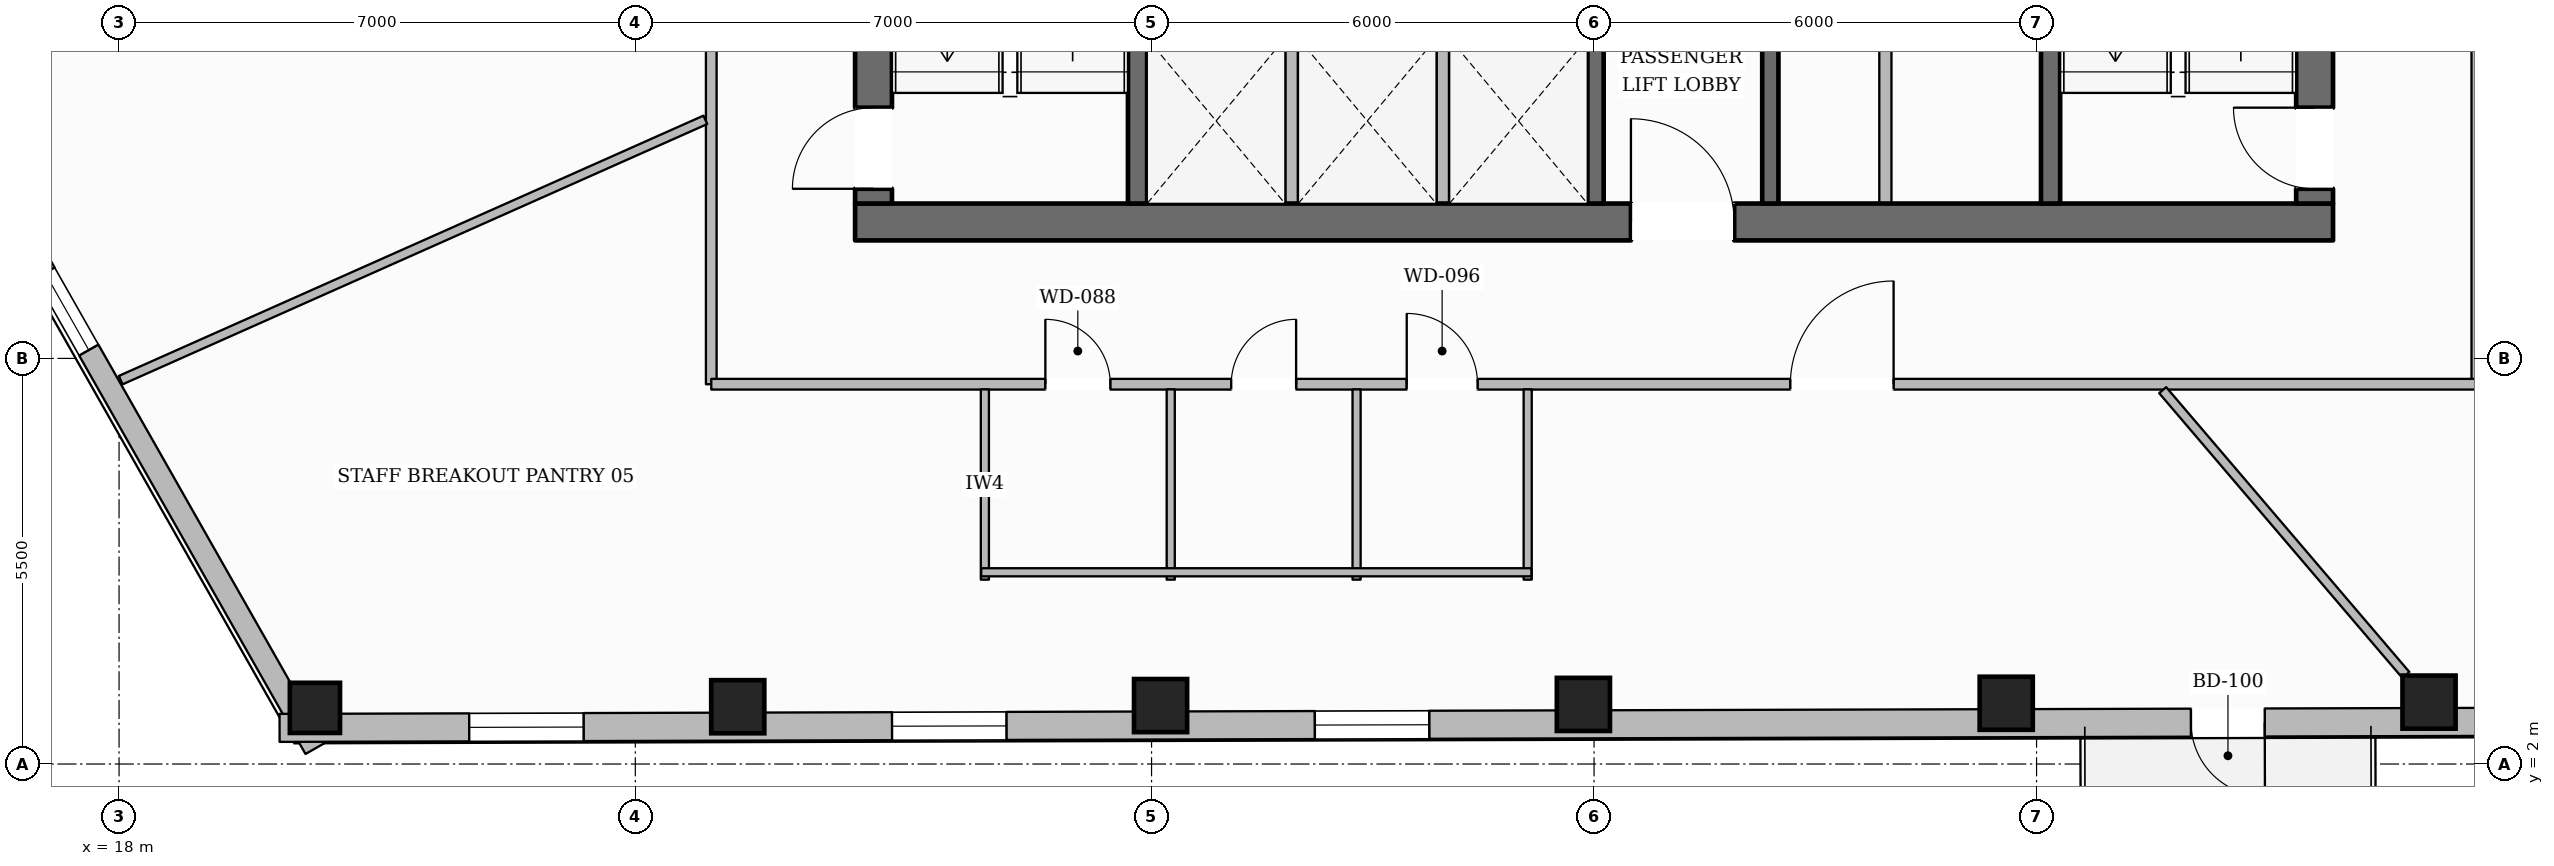
"""IFC4 building model, lengths in metres.
Left out: names, types, materials, properties, quantities, classifications, styles, units other than length and angle.
Written with IfcOpenShell. Run it as: python <this file> out.ifc"""

import sys

from ifc_helpers import new_model, si_unit, direction, frame, frame_2d, origin, origin_2d, place, context, subcontext, project, spatial, rectangle, hollow_rectangle, extrude, element, fill, save


model = new_model("IFC4")
c1 = context("Model", 3, precision=1e-05, world=origin(), true_north=direction((0.0, 1.0)))
c2 = subcontext(c1, "Body", "Model", "MODEL_VIEW")
j1 = project(units=[si_unit("LENGTHUNIT", "METRE"), si_unit("PLANEANGLEUNIT", "RADIAN")], contexts=[c1])
p1 = place(None, origin())
s1 = spatial("IfcSite", under=j1, at=p1, CompositionType="ELEMENT")
p2 = place(p1, origin())
s2 = spatial("IfcBuilding", under=s1, at=p2, CompositionType="ELEMENT")
p3 = place(p2, frame((0.0, 0.0, 89.35)))
s3 = spatial("IfcBuildingStorey", under=s2, at=p3, CompositionType="ELEMENT", Elevation=89.35)
p4 = place(p3, frame((27.98, 9.35, 0.0), z_axis=(0.0, 0.0, 1.0), x_axis=(1.0, 0.0, 0.0)))
e1 = element("IfcWall", 1, at=p4, inside=s3, PredefinedType="SOLIDWALL", context=c2, shape_type="SweptSolid", body=[
    extrude(rectangle(XDim=20.04, YDim=0.5, at=frame_2d((10.02, 0.0))), origin(), (0.0, 0.0, 1.0), 3.6),
])
p5 = place(p4, frame((10.52, 0.0, 0.0)))
e2 = element("IfcOpeningElement", 2, at=p5, cuts=e1, PredefinedType="OPENING", context=c2, shape_type="SweptSolid", body=[
    extrude(rectangle(XDim=1.4, YDim=2.2, at=frame_2d((0.7, 1.1))), frame((0.0, 0.26, 0.0), z_axis=(0.0, -1.0, 0.0), x_axis=(1.0, 0.0, 0.0)), (0.0, 0.0, 1.0), 0.52),
])
p6 = place(p3, frame((28.23, 9.6, 0.0), z_axis=(0.0, 0.0, 1.0), x_axis=(0.0, 1.0, 0.0)))
e3 = element("IfcWall", 3, at=p6, inside=s3, PredefinedType="SOLIDWALL", context=c2, shape_type="SweptSolid", body=[
    extrude(rectangle(XDim=13.0, YDim=0.5, at=frame_2d((6.5, 0.0))), origin(), (0.0, 0.0, 1.0), 3.6),
])
p7 = place(p6, frame((0.2, 0.0, 0.0)))
e4 = element("IfcOpeningElement", 4, at=p7, cuts=e3, PredefinedType="OPENING", context=c2, shape_type="SweptSolid", body=[
    extrude(rectangle(XDim=1.1, YDim=2.15, at=frame_2d((0.55, 1.075))), frame((0.0, 0.26, 0.0), z_axis=(0.0, -1.0, 0.0), x_axis=(1.0, 0.0, 0.0)), (0.0, 0.0, 1.0), 0.52),
])
p8 = place(p6, frame((8.4, 0.0, 0.0)))
e5 = element("IfcOpeningElement", 5, at=p8, cuts=e3, PredefinedType="OPENING", context=c2, shape_type="SweptSolid", body=[
    extrude(rectangle(XDim=0.9, YDim=2.1, at=frame_2d((0.45, 1.05))), frame((0.0, 0.26, 0.0), z_axis=(0.0, -1.0, 0.0), x_axis=(1.0, 0.0, 0.0)), (0.0, 0.0, 1.0), 0.52),
])
p9 = place(p3, frame((47.77, 9.6, 0.0), z_axis=(0.0, 0.0, 1.0), x_axis=(0.0, 1.0, 0.0)))
e6 = element("IfcWall", 6, at=p9, inside=s3, PredefinedType="SOLIDWALL", context=c2, shape_type="SweptSolid", body=[
    extrude(rectangle(XDim=13.0, YDim=0.5, at=frame_2d((6.5, 0.0))), origin(), (0.0, 0.0, 1.0), 3.6),
])
p10 = place(p9, frame((0.2, 0.0, 0.0)))
e7 = element("IfcOpeningElement", 7, at=p10, cuts=e6, PredefinedType="OPENING", context=c2, shape_type="SweptSolid", body=[
    extrude(rectangle(XDim=1.1, YDim=2.15, at=frame_2d((0.55, 1.075))), frame((0.0, 0.26, 0.0), z_axis=(0.0, -1.0, 0.0), x_axis=(1.0, 0.0, 0.0)), (0.0, 0.0, 1.0), 0.52),
])
p11 = place(p9, frame((8.4, 0.0, 0.0)))
e8 = element("IfcOpeningElement", 8, at=p11, cuts=e6, PredefinedType="OPENING", context=c2, shape_type="SweptSolid", body=[
    extrude(rectangle(XDim=0.9, YDim=2.1, at=frame_2d((0.45, 1.05))), frame((0.0, 0.26, 0.0), z_axis=(0.0, -1.0, 0.0), x_axis=(1.0, 0.0, 0.0)), (0.0, 0.0, 1.0), 0.52),
])
p12 = place(p3, frame((31.81, 9.6, 0.0), z_axis=(0.0, 0.0, 1.0), x_axis=(0.0, 1.0, 0.0)))
e9 = element("IfcWall", 9, at=p12, inside=s3, PredefinedType="SHEAR", context=c2, shape_type="SweptSolid", body=[
    extrude(rectangle(XDim=13.0, YDim=0.26, at=frame_2d((6.5, 0.0))), origin(), (0.0, 0.0, 1.0), 3.6),
])
p13 = place(p12, frame((10.925, 0.0, 0.0)))
e10 = element("IfcOpeningElement", 10, at=p13, cuts=e9, PredefinedType="OPENING", context=c2, shape_type="SweptSolid", body=[
    extrude(rectangle(XDim=1.25, YDim=2.25, at=frame_2d((0.625, 1.125))), frame((0.0, 0.14, 0.0), z_axis=(0.0, -1.0, 0.0), x_axis=(1.0, 0.0, 0.0)), (0.0, 0.0, 1.0), 0.28),
])
p14 = place(p3, frame((44.19, 9.6, 0.0), z_axis=(0.0, 0.0, 1.0), x_axis=(0.0, 1.0, 0.0)))
e11 = element("IfcWall", 11, at=p14, inside=s3, PredefinedType="SHEAR", context=c2, shape_type="SweptSolid", body=[
    extrude(rectangle(XDim=13.0, YDim=0.26, at=frame_2d((6.5, 0.0))), origin(), (0.0, 0.0, 1.0), 3.6),
])
p15 = place(p14, frame((10.925, 0.0, 0.0)))
e12 = element("IfcOpeningElement", 12, at=p15, cuts=e11, PredefinedType="OPENING", context=c2, shape_type="SweptSolid", body=[
    extrude(rectangle(XDim=1.25, YDim=2.25, at=frame_2d((0.625, 1.125))), frame((0.0, 0.14, 0.0), z_axis=(0.0, -1.0, 0.0), x_axis=(1.0, 0.0, 0.0)), (0.0, 0.0, 1.0), 0.28),
])
for number, where, z_axis, x_axis in (
    (13, (38.02, 9.6, 0.0), (0.0, 0.0, 1.0), (0.0, 1.0, 0.0)),
    (14, (40.39, 9.6, 0.0), (0.0, 0.0, 1.0), (0.0, 1.0, 0.0)),
):
    element("IfcWall", number, at=place(p3, frame(where, z_axis=z_axis, x_axis=x_axis)), inside=s3, PredefinedType="SOLIDWALL", context=c2, shape_type="SweptSolid", body=[
        extrude(rectangle(XDim=2.24, YDim=0.22, at=frame_2d((1.12, 0.0))), origin(), (0.0, 0.0, 1.0), 3.6),
    ])
p16 = place(p3, frame((20.656, 2.761, 0.0), z_axis=(0.0, 0.0, 1.0), x_axis=(1.0, 0.0, 0.0)))
e15 = element("IfcColumn", 15, at=p16, inside=s3, PredefinedType="COLUMN", context=c2, shape_type="SweptSolid", body=[
    extrude(hollow_rectangle(XDim=0.68, YDim=0.68, WallThickness=0.03, at=origin_2d()), origin(), (0.0, 0.0, 1.0), 3.6),
])
for number, where, z_axis, x_axis in (
    (16, (26.389, 2.777, 0.0), (0.0, 0.0, 1.0), (1.0, 0.0, 0.0)),
    (17, (32.122, 2.792, 0.0), (0.0, 0.0, 1.0), (1.0, 0.0, 0.0)),
    (18, (37.855, 2.808, 0.0), (0.0, 0.0, 1.0), (1.0, 0.0, 0.0)),
    (19, (43.589, 2.824, 0.0), (0.0, 0.0, 1.0), (1.0, 0.0, 0.0)),
    (20, (49.322, 2.839, 0.0), (0.0, 0.0, 1.0), (1.0, 0.0, 0.0)),
):
    element("IfcColumn", number, at=place(p3, frame(where, z_axis=z_axis, x_axis=x_axis)), inside=s3, PredefinedType="COLUMN", context=c2, shape_type="SweptSolid", body=[
        extrude(hollow_rectangle(XDim=0.72, YDim=0.72, WallThickness=0.032, at=origin_2d()), origin(), (0.0, 0.0, 1.0), 3.6),
    ])
p17 = place(p3, frame((20.658, 2.21, 0.0), z_axis=(0.0, 0.0, 1.0), x_axis=(-0.493913076268, 0.869511284051, 0.0)))
e21 = element("IfcWall", 21, at=p17, inside=s3, PredefinedType="STANDARD", context=c2, shape_type="SweptSolid", body=[
    extrude(rectangle(XDim=13.629, YDim=0.3, at=frame_2d((6.815, 0.0))), origin(), (0.0, 0.0, 1.0), 3.059),
])
p18 = place(p17, frame((6.215, 0.0, 0.65)))
e22 = element("IfcOpeningElement", 22, at=p18, cuts=e21, PredefinedType="OPENING", context=c2, shape_type="SweptSolid", body=[
    extrude(rectangle(XDim=1.2, YDim=1.7, at=frame_2d((0.6, 0.85))), frame((0.0, 0.16, 0.0), z_axis=(0.0, -1.0, 0.0), x_axis=(1.0, 0.0, 0.0)), (0.0, 0.0, 1.0), 0.32),
])
p19 = place(p3, frame((55.533, 2.586, 0.0), z_axis=(0.0, 0.0, 1.0), x_axis=(-0.999996299189, -0.002720589845, 0.0)))
e23 = element("IfcWall", 23, at=p19, inside=s3, PredefinedType="STANDARD", context=c2, shape_type="SweptSolid", body=[
    extrude(rectangle(XDim=35.357, YDim=0.38, at=frame_2d((17.678, 0.0))), origin(), (0.0, 0.0, 1.0), 3.059),
])
p20 = place(p19, frame((8.439, 0.0, 0.0)))
e24 = element("IfcOpeningElement", 24, at=p20, cuts=e23, PredefinedType="OPENING", context=c2, shape_type="SweptSolid", body=[
    extrude(rectangle(XDim=1.0, YDim=2.2, at=frame_2d((0.5, 1.1))), frame((0.0, 0.2, 0.0), z_axis=(0.0, -1.0, 0.0), x_axis=(1.0, 0.0, 0.0)), (0.0, 0.0, 1.0), 0.4),
])
p21 = place(p19, frame((31.235, 0.0, 0.65)))
e25 = element("IfcOpeningElement", 25, at=p21, cuts=e23, PredefinedType="OPENING", context=c2, shape_type="SweptSolid", body=[
    extrude(rectangle(XDim=1.55, YDim=1.75, at=frame_2d((0.775, 0.875))), frame((0.0, 0.2, 0.0), z_axis=(0.0, -1.0, 0.0), x_axis=(1.0, 0.0, 0.0)), (0.0, 0.0, 1.0), 0.4),
])
p22 = place(p19, frame((25.502, 0.0, 0.65)))
e26 = element("IfcOpeningElement", 26, at=p22, cuts=e23, PredefinedType="OPENING", context=c2, shape_type="SweptSolid", body=[
    extrude(rectangle(XDim=1.55, YDim=1.75, at=frame_2d((0.775, 0.875))), frame((0.0, 0.2, 0.0), z_axis=(0.0, -1.0, 0.0), x_axis=(1.0, 0.0, 0.0)), (0.0, 0.0, 1.0), 0.4),
])
p23 = place(p19, frame((19.769, 0.0, 0.65)))
e27 = element("IfcOpeningElement", 27, at=p23, cuts=e23, PredefinedType="OPENING", context=c2, shape_type="SweptSolid", body=[
    extrude(rectangle(XDim=1.55, YDim=1.75, at=frame_2d((0.775, 0.875))), frame((0.0, 0.2, 0.0), z_axis=(0.0, -1.0, 0.0), x_axis=(1.0, 0.0, 0.0)), (0.0, 0.0, 1.0), 0.4),
])
p24 = place(p19, frame((2.569, 0.0, 0.65)))
e28 = element("IfcOpeningElement", 28, at=p24, cuts=e23, PredefinedType="OPENING", context=c2, shape_type="SweptSolid", body=[
    extrude(rectangle(XDim=1.55, YDim=1.75, at=frame_2d((0.775, 0.875))), frame((0.0, 0.2, 0.0), z_axis=(0.0, -1.0, 0.0), x_axis=(1.0, 0.0, 0.0)), (0.0, 0.0, 1.0), 0.4),
])
for number, where, z_axis, x_axis in (
    (29, (33.9, 9.55, 0.0), (0.0, 0.0, 1.0), (0.0, 1.0, 0.0)),
    (30, (35.95, 9.55, 0.0), (0.0, 0.0, 1.0), (0.0, 1.0, 0.0)),
    (31, (41.95, 9.55, 0.0), (0.0, 0.0, 1.0), (0.0, 1.0, 0.0)),
):
    element("IfcWall", number, at=place(p3, frame(where, z_axis=z_axis, x_axis=x_axis)), inside=s3, PredefinedType="PARTITIONING", context=c2, shape_type="SweptSolid", body=[
        extrude(rectangle(XDim=2.29, YDim=0.165, at=frame_2d((1.145, 0.0))), origin(), (0.0, 0.0, 1.0), 3.6),
    ])
p25 = place(p3, frame((49.97, 7.15, 0.0), z_axis=(0.0, 0.0, 1.0), x_axis=(0.0, 1.0, 0.0)))
e32 = element("IfcWall", 32, at=p25, inside=s3, PredefinedType="PARTITIONING", context=c2, shape_type="SweptSolid", body=[
    extrude(rectangle(XDim=17.9, YDim=0.145, at=frame_2d((8.95, 0.0))), origin(), (0.0, 0.0, 1.0), 3.288),
])
p26 = place(p25, frame((6.54, 0.0, 0.0)))
e33 = element("IfcOpeningElement", 33, at=p26, cuts=e32, PredefinedType="OPENING", context=c2, shape_type="SweptSolid", body=[
    extrude(rectangle(XDim=1.4, YDim=2.2, at=frame_2d((0.7, 1.1))), frame((0.0, 0.083, 0.0), z_axis=(0.0, -1.0, 0.0), x_axis=(1.0, 0.0, 0.0)), (0.0, 0.0, 1.0), 0.165),
])
p27 = place(p3, frame((26.03, 25.05, 0.0), z_axis=(0.0, 0.0, 1.0), x_axis=(0.0, -1.0, 0.0)))
e34 = element("IfcWall", 34, at=p27, inside=s3, PredefinedType="PARTITIONING", context=c2, shape_type="SweptSolid", body=[
    extrude(rectangle(XDim=17.9, YDim=0.145, at=frame_2d((8.95, 0.0))), origin(), (0.0, 0.0, 1.0), 3.288),
])
p28 = place(p27, frame((8.311, 0.0, 0.0)))
e35 = element("IfcOpeningElement", 35, at=p28, cuts=e34, PredefinedType="OPENING", context=c2, shape_type="SweptSolid", body=[
    extrude(rectangle(XDim=1.4, YDim=2.2, at=frame_2d((0.7, 1.1))), frame((0.0, 0.083, 0.0), z_axis=(0.0, -1.0, 0.0), x_axis=(1.0, 0.0, 0.0)), (0.0, 0.0, 1.0), 0.165),
])
p29 = place(p3, frame((26.03, 7.15, 0.0), z_axis=(0.0, 0.0, 1.0), x_axis=(1.0, 0.0, 0.0)))
e36 = element("IfcWall", 36, at=p29, inside=s3, PredefinedType="PARTITIONING", context=c2, shape_type="SweptSolid", body=[
    extrude(rectangle(XDim=23.94, YDim=0.145, at=frame_2d((11.97, 0.0))), origin(), (0.0, 0.0, 1.0), 3.6),
])
p30 = place(p29, frame((4.53, 0.0, 0.0)))
e37 = element("IfcOpeningElement", 37, at=p30, cuts=e36, PredefinedType="OPENING", context=c2, shape_type="SweptSolid", body=[
    extrude(rectangle(XDim=0.88, YDim=2.1, at=frame_2d((0.44, 1.05))), frame((0.0, 0.083, 0.0), z_axis=(0.0, -1.0, 0.0), x_axis=(1.0, 0.0, 0.0)), (0.0, 0.0, 1.0), 0.165),
])
p31 = place(p29, frame((7.05, 0.0, 0.0)))
e38 = element("IfcOpeningElement", 38, at=p31, cuts=e36, PredefinedType="OPENING", context=c2, shape_type="SweptSolid", body=[
    extrude(rectangle(XDim=0.88, YDim=2.1, at=frame_2d((0.44, 1.05))), frame((0.0, 0.083, 0.0), z_axis=(0.0, -1.0, 0.0), x_axis=(1.0, 0.0, 0.0)), (0.0, 0.0, 1.0), 0.165),
])
p32 = place(p29, frame((9.43, 0.0, 0.0)))
e39 = element("IfcOpeningElement", 39, at=p32, cuts=e36, PredefinedType="OPENING", context=c2, shape_type="SweptSolid", body=[
    extrude(rectangle(XDim=0.96, YDim=2.1, at=frame_2d((0.48, 1.05))), frame((0.0, 0.083, 0.0), z_axis=(0.0, -1.0, 0.0), x_axis=(1.0, 0.0, 0.0)), (0.0, 0.0, 1.0), 0.165),
])
p33 = place(p29, frame((14.632, 0.0, 0.0)))
e40 = element("IfcOpeningElement", 40, at=p33, cuts=e36, PredefinedType="OPENING", context=c2, shape_type="SweptSolid", body=[
    extrude(rectangle(XDim=1.4, YDim=2.2, at=frame_2d((0.7, 1.1))), frame((0.0, 0.083, 0.0), z_axis=(0.0, -1.0, 0.0), x_axis=(1.0, 0.0, 0.0)), (0.0, 0.0, 1.0), 0.165),
])
p34 = place(p3, frame((29.74, 4.5, 0.0), z_axis=(0.0, 0.0, 1.0), x_axis=(0.0, 1.0, 0.0)))
e41 = element("IfcWall", 41, at=p34, inside=s3, PredefinedType="PLUMBINGWALL", context=c2, shape_type="SweptSolid", body=[
    extrude(rectangle(XDim=2.58, YDim=0.11, at=frame_2d((1.29, 0.0))), origin(), (0.0, 0.0, 1.0), 3.6),
])
p35 = place(p3, frame((32.26, 4.5, 0.0), z_axis=(0.0, 0.0, 1.0), x_axis=(0.0, 1.0, 0.0)))
e42 = element("IfcWall", 42, at=p35, inside=s3, PredefinedType="PLUMBINGWALL", context=c2, shape_type="SweptSolid", body=[
    extrude(rectangle(XDim=2.58, YDim=0.11, at=frame_2d((1.29, 0.0))), origin(), (0.0, 0.0, 1.0), 3.141),
])
for number, where, z_axis, x_axis in (
    (43, (34.78, 4.5, 0.0), (0.0, 0.0, 1.0), (0.0, 1.0, 0.0)),
    (44, (37.1, 4.5, 0.0), (0.0, 0.0, 1.0), (0.0, 1.0, 0.0)),
):
    element("IfcWall", number, at=place(p3, frame(where, z_axis=z_axis, x_axis=x_axis)), inside=s3, PredefinedType="PLUMBINGWALL", context=c2, shape_type="SweptSolid", body=[
        extrude(rectangle(XDim=2.58, YDim=0.11, at=frame_2d((1.29, 0.0))), origin(), (0.0, 0.0, 1.0), 3.6),
    ])
p36 = place(p3, frame((29.69, 4.6, 0.0), z_axis=(0.0, 0.0, 1.0), x_axis=(1.0, 0.0, 0.0)))
e45 = element("IfcWall", 45, at=p36, inside=s3, PredefinedType="PLUMBINGWALL", context=c2, shape_type="SweptSolid", body=[
    extrude(rectangle(XDim=7.46, YDim=0.11, at=frame_2d((3.73, 0.0))), origin(), (0.0, 0.0, 1.0), 3.6),
])
p37 = place(p3, frame((25.949, 10.735, 0.0), z_axis=(0.0, 0.0, 1.0), x_axis=(-0.913551473061, -0.406723131955, 0.0)))
e46 = element("IfcWall", 46, at=p37, inside=s3, PredefinedType="PARTITIONING", context=c2, shape_type="SweptSolid", body=[
    extrude(rectangle(XDim=8.677, YDim=0.125, at=frame_2d((4.339, 0.0))), origin(), (0.0, 0.0, 1.0), 3.6),
])
p38 = place(p3, frame((45.71, 7.07, 0.0), z_axis=(0.0, 0.0, 1.0), x_axis=(0.649317320113, -0.760517598613, 0.0)))
e47 = element("IfcWall", 47, at=p38, inside=s3, PredefinedType="PARTITIONING", context=c2, shape_type="SweptSolid", body=[
    extrude(rectangle(XDim=5.078, YDim=0.125, at=frame_2d((2.539, 0.0))), origin(), (0.0, 0.0, 1.0), 3.6),
])
p39 = place(p20, origin())
e48 = element("IfcDoor", 48, at=p39, inside=s3, OperationType="SINGLE_SWING_LEFT", PredefinedType="DOOR", context=c2, shape_type="SweptSolid", body=[
    extrude(rectangle(XDim=1.0, YDim=2.2, at=frame_2d((0.5, 1.1))), frame((0.0, 0.025, 0.0), z_axis=(0.0, -1.0, 0.0), x_axis=(1.0, 0.0, 0.0)), (0.0, 0.0, 1.0), 0.05),
])
fill(e24, e48)
p40 = place(p21, origin())
e49 = element("IfcWindow", 49, at=p40, inside=s3, PartitioningType="SINGLE_PANEL", PredefinedType="WINDOW", context=c2, shape_type="SweptSolid", body=[
    extrude(rectangle(XDim=1.55, YDim=1.75, at=frame_2d((0.775, 0.875))), frame((0.0, 0.03, 0.0), z_axis=(0.0, -1.0, 0.0), x_axis=(1.0, 0.0, 0.0)), (0.0, 0.0, 1.0), 0.06),
])
fill(e25, e49)
p41 = place(p22, origin())
e50 = element("IfcWindow", 50, at=p41, inside=s3, PartitioningType="SINGLE_PANEL", PredefinedType="WINDOW", context=c2, shape_type="SweptSolid", body=[
    extrude(rectangle(XDim=1.55, YDim=1.75, at=frame_2d((0.775, 0.875))), frame((0.0, 0.03, 0.0), z_axis=(0.0, -1.0, 0.0), x_axis=(1.0, 0.0, 0.0)), (0.0, 0.0, 1.0), 0.06),
])
fill(e26, e50)
p42 = place(p23, origin())
e51 = element("IfcWindow", 51, at=p42, inside=s3, PartitioningType="SINGLE_PANEL", PredefinedType="WINDOW", context=c2, shape_type="SweptSolid", body=[
    extrude(rectangle(XDim=1.55, YDim=1.75, at=frame_2d((0.775, 0.875))), frame((0.0, 0.03, 0.0), z_axis=(0.0, -1.0, 0.0), x_axis=(1.0, 0.0, 0.0)), (0.0, 0.0, 1.0), 0.06),
])
fill(e27, e51)
p43 = place(p18, origin())
e52 = element("IfcWindow", 52, at=p43, inside=s3, PartitioningType="SINGLE_PANEL", PredefinedType="WINDOW", context=c2, shape_type="SweptSolid", body=[
    extrude(rectangle(XDim=1.2, YDim=1.7, at=frame_2d((0.6, 0.85))), frame((0.0, 0.03, 0.0), z_axis=(0.0, -1.0, 0.0), x_axis=(1.0, 0.0, 0.0)), (0.0, 0.0, 1.0), 0.06),
])
fill(e22, e52)
p44 = place(p7, origin())
e53 = element("IfcDoor", 53, at=p44, inside=s3, OperationType="SINGLE_SWING_LEFT", PredefinedType="DOOR", context=c2, shape_type="SweptSolid", body=[
    extrude(rectangle(XDim=1.1, YDim=2.15, at=frame_2d((0.55, 1.075))), frame((0.0, 0.025, 0.0), z_axis=(0.0, -1.0, 0.0), x_axis=(1.0, 0.0, 0.0)), (0.0, 0.0, 1.0), 0.05),
])
fill(e4, e53)
p45 = place(p10, origin())
e54 = element("IfcDoor", 54, at=p45, inside=s3, OperationType="SINGLE_SWING_RIGHT", PredefinedType="DOOR", context=c2, shape_type="SweptSolid", body=[
    extrude(rectangle(XDim=1.1, YDim=2.15, at=frame_2d((0.55, 1.075))), frame((0.0, 0.025, 0.0), z_axis=(0.0, -1.0, 0.0), x_axis=(1.0, 0.0, 0.0)), (0.0, 0.0, 1.0), 0.05),
])
fill(e7, e54)
p46 = place(p5, origin())
e55 = element("IfcDoor", 55, at=p46, inside=s3, OperationType="SINGLE_SWING_LEFT", PredefinedType="DOOR", context=c2, shape_type="SweptSolid", body=[
    extrude(rectangle(XDim=1.4, YDim=2.2, at=frame_2d((0.7, 1.1))), frame((0.0, 0.025, 0.0), z_axis=(0.0, -1.0, 0.0), x_axis=(1.0, 0.0, 0.0)), (0.0, 0.0, 1.0), 0.05),
])
fill(e2, e55)
p47 = place(p30, origin())
e56 = element("IfcDoor", 56, at=p47, inside=s3, OperationType="SINGLE_SWING_LEFT", PredefinedType="DOOR", context=c2, shape_type="SweptSolid", body=[
    extrude(rectangle(XDim=0.88, YDim=2.1, at=frame_2d((0.44, 1.05))), frame((0.0, 0.025, 0.0), z_axis=(0.0, -1.0, 0.0), x_axis=(1.0, 0.0, 0.0)), (0.0, 0.0, 1.0), 0.05),
])
fill(e37, e56)
p48 = place(p31, origin())
e57 = element("IfcDoor", 57, at=p48, inside=s3, OperationType="SINGLE_SWING_RIGHT", PredefinedType="DOOR", context=c2, shape_type="SweptSolid", body=[
    extrude(rectangle(XDim=0.88, YDim=2.1, at=frame_2d((0.44, 1.05))), frame((0.0, 0.025, 0.0), z_axis=(0.0, -1.0, 0.0), x_axis=(1.0, 0.0, 0.0)), (0.0, 0.0, 1.0), 0.05),
])
fill(e38, e57)
p49 = place(p32, origin())
e58 = element("IfcDoor", 58, at=p49, inside=s3, OperationType="SINGLE_SWING_LEFT", PredefinedType="DOOR", context=c2, shape_type="SweptSolid", body=[
    extrude(rectangle(XDim=0.96, YDim=2.1, at=frame_2d((0.48, 1.05))), frame((0.0, 0.025, 0.0), z_axis=(0.0, -1.0, 0.0), x_axis=(1.0, 0.0, 0.0)), (0.0, 0.0, 1.0), 0.05),
])
fill(e39, e58)
p50 = place(p33, origin())
e59 = element("IfcDoor", 59, at=p50, inside=s3, OperationType="SINGLE_SWING_RIGHT", PredefinedType="DOOR", context=c2, shape_type="SweptSolid", body=[
    extrude(rectangle(XDim=1.4, YDim=2.2, at=frame_2d((0.7, 1.1))), frame((0.0, 0.025, 0.0), z_axis=(0.0, -1.0, 0.0), x_axis=(1.0, 0.0, 0.0)), (0.0, 0.0, 1.0), 0.05),
])
fill(e40, e59)
save(model, sys.argv[1])
